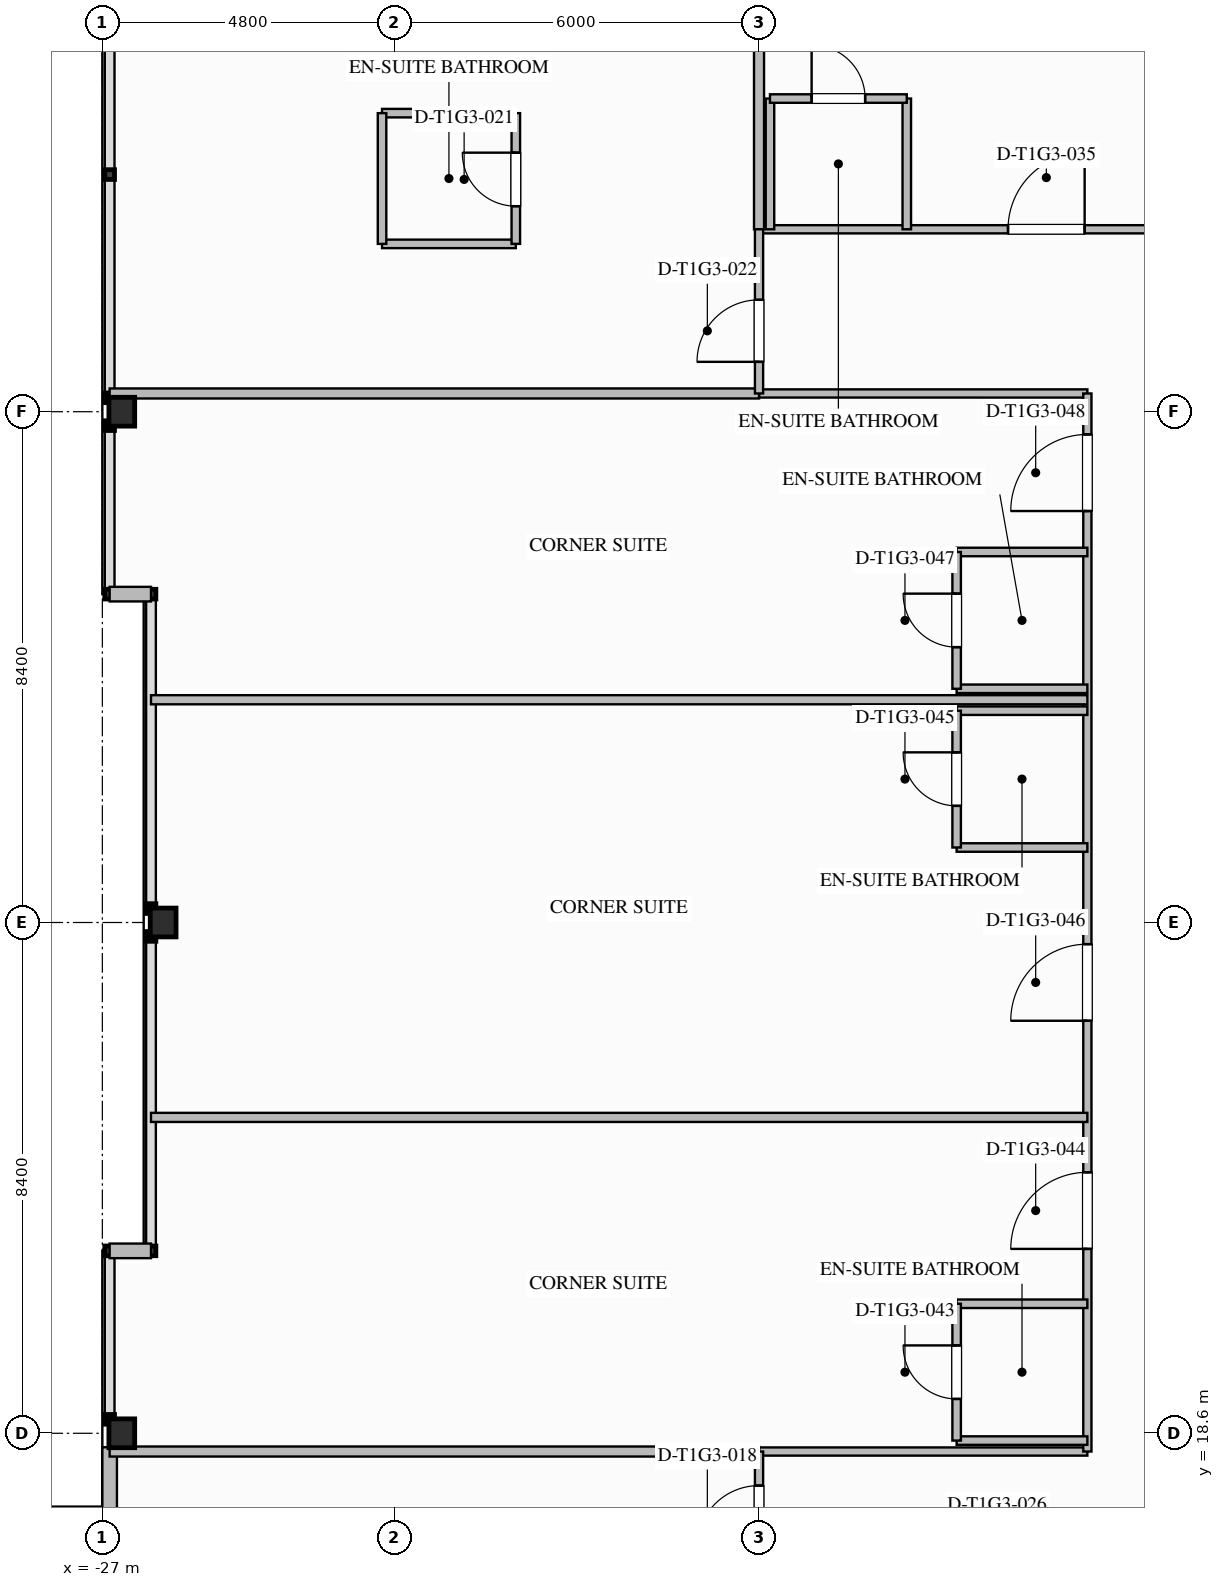
"""IFC4 building model, lengths in metres.
Left out: names, types, materials, properties, quantities, classifications, styles, units other than length and angle.
Written with IfcOpenShell. Run it as: python <this file> out.ifc"""

import sys

from ifc_helpers import new_model, si_unit, direction, frame, frame_2d, origin, origin_2d, place, context, subcontext, project, spatial, rectangle, i_section, extrude, element, fill, save


model = new_model("IFC4")
c1 = context("Model", 3, precision=1e-05, world=origin(), true_north=direction((0.0, 1.0)))
c2 = subcontext(c1, "Body", "Model", "MODEL_VIEW")
j1 = project(units=[si_unit("LENGTHUNIT", "METRE"), si_unit("PLANEANGLEUNIT", "RADIAN")], contexts=[c1])
p1 = place(None, origin())
s1 = spatial("IfcSite", under=j1, at=p1, CompositionType="ELEMENT")
p2 = place(p1, origin())
s2 = spatial("IfcBuilding", under=s1, at=p2, CompositionType="ELEMENT")
p3 = place(p2, frame((0.0, 0.0, 61.2)))
s3 = spatial("IfcBuildingStorey", under=s2, at=p3, CompositionType="ELEMENT", Elevation=61.2)
for number, where, z_axis, x_axis in (
    (1, (-26.68, 18.6, 0.0), (0.0, 0.0, 1.0), (1.0, 0.0, 0.0)),
    (2, (-26.0, 27.0, 0.0), (0.0, 0.0, 1.0), (1.0, 0.0, 0.0)),
    (3, (-26.68, 35.4, 0.0), (0.0, 0.0, 1.0), (1.0, 0.0, 0.0)),
):
    element("IfcColumn", number, at=place(p3, frame(where, z_axis=z_axis, x_axis=x_axis)), inside=s3, PredefinedType="COLUMN", context=c2, shape_type="SweptSolid", body=[
        extrude(i_section(OverallWidth=0.424, OverallDepth=0.474, WebThickness=0.048, FlangeThickness=0.077, FilletRadius=0.03, at=origin_2d()), origin(), (0.0, 0.0, 1.0), 3.497),
    ])
p4 = place(p3, frame((-26.88, 11.029, 0.0), z_axis=(0.0, 0.0, 1.0), x_axis=(0.0, 1.0, 0.0)))
e4 = element("IfcWall", 4, at=p4, inside=s3, PredefinedType="STANDARD", context=c2, shape_type="SweptSolid", body=[
    extrude(rectangle(XDim=7.342, YDim=0.24, at=frame_2d((3.671, 0.0))), origin(), (0.0, 0.0, 1.0), 2.629),
])
p5 = place(p4, frame((4.571, 0.0, 0.0)))
e5 = element("IfcOpeningElement", 5, at=p5, cuts=e4, PredefinedType="OPENING", context=c2, shape_type="SweptSolid", body=[
    extrude(rectangle(XDim=1.0, YDim=2.2, at=frame_2d((0.5, 1.1))), frame((0.0, 0.13, 0.0), z_axis=(0.0, -1.0, 0.0), x_axis=(1.0, 0.0, 0.0)), (0.0, 0.0, 1.0), 0.26),
])
p6 = place(p4, frame((1.559, 0.0, 0.75)))
e6 = element("IfcOpeningElement", 6, at=p6, cuts=e4, PredefinedType="OPENING", context=c2, shape_type="SweptSolid", body=[
    extrude(rectangle(XDim=1.8, YDim=1.779, at=frame_2d((0.9, 0.89))), frame((0.0, 0.13, 0.0), z_axis=(0.0, -1.0, 0.0), x_axis=(1.0, 0.0, 0.0)), (0.0, 0.0, 1.0), 0.26),
])
for number, where, z_axis, x_axis in (
    (7, (-26.88, 21.6, 0.0), (0.0, 0.0, 1.0), (1.0, 0.0, 0.0)),
    (8, (-26.2, 32.4, 0.0), (0.0, 0.0, 1.0), (-1.0, 0.0, 0.0)),
):
    element("IfcWall", number, at=place(p3, frame(where, z_axis=z_axis, x_axis=x_axis)), inside=s3, PredefinedType="STANDARD", context=c2, shape_type="SweptSolid", body=[
        extrude(rectangle(XDim=0.68, YDim=0.24, at=frame_2d((0.34, 0.0))), origin(), (0.0, 0.0, 1.0), 3.24),
    ])
p7 = place(p3, frame((-16.2, 38.4, 0.0), z_axis=(0.0, 0.0, 1.0), x_axis=(1.0, 0.0, 0.0)))
e9 = element("IfcWall", 9, at=p7, inside=s3, PredefinedType="PARTITIONING", context=c2, shape_type="SweptSolid", body=[
    extrude(rectangle(XDim=32.4, YDim=0.135, at=frame_2d((16.2, 0.0))), origin(), (0.0, 0.0, 1.0), 3.24),
])
p8 = place(p7, frame((4.095, 0.0, 0.0)))
e10 = element("IfcOpeningElement", 10, at=p8, cuts=e9, PredefinedType="OPENING", context=c2, shape_type="SweptSolid", body=[
    extrude(rectangle(XDim=1.26, YDim=2.2, at=frame_2d((0.63, 1.1))), frame((0.0, 0.077, 0.0), z_axis=(0.0, -1.0, 0.0), x_axis=(1.0, 0.0, 0.0)), (0.0, 0.0, 1.0), 0.155),
])
p9 = place(p7, frame((7.875, 0.0, 0.0)))
e11 = element("IfcOpeningElement", 11, at=p9, cuts=e9, PredefinedType="OPENING", context=c2, shape_type="SweptSolid", body=[
    extrude(rectangle(XDim=1.26, YDim=2.2, at=frame_2d((0.63, 1.1))), frame((0.0, 0.077, 0.0), z_axis=(0.0, -1.0, 0.0), x_axis=(1.0, 0.0, 0.0)), (0.0, 0.0, 1.0), 0.155),
])
p10 = place(p7, frame((15.69, 0.0, 0.0)))
e12 = element("IfcOpeningElement", 12, at=p10, cuts=e9, PredefinedType="OPENING", context=c2, shape_type="SweptSolid", body=[
    extrude(rectangle(XDim=1.02, YDim=2.15, at=frame_2d((0.51, 1.075))), frame((0.0, 0.077, 0.0), z_axis=(0.0, -1.0, 0.0), x_axis=(1.0, 0.0, 0.0)), (0.0, 0.0, 1.0), 0.155),
])
p11 = place(p7, frame((21.645, 0.0, 0.0)))
e13 = element("IfcOpeningElement", 13, at=p11, cuts=e9, PredefinedType="OPENING", context=c2, shape_type="SweptSolid", body=[
    extrude(rectangle(XDim=1.26, YDim=2.2, at=frame_2d((0.63, 1.1))), frame((0.0, 0.077, 0.0), z_axis=(0.0, -1.0, 0.0), x_axis=(1.0, 0.0, 0.0)), (0.0, 0.0, 1.0), 0.155),
])
p12 = place(p7, frame((30.285, 0.0, 0.0)))
e14 = element("IfcOpeningElement", 14, at=p12, cuts=e9, PredefinedType="OPENING", context=c2, shape_type="SweptSolid", body=[
    extrude(rectangle(XDim=1.26, YDim=2.2, at=frame_2d((0.63, 1.1))), frame((0.0, 0.077, 0.0), z_axis=(0.0, -1.0, 0.0), x_axis=(1.0, 0.0, 0.0)), (0.0, 0.0, 1.0), 0.155),
])
for number, where, z_axis, x_axis in (
    (15, (-16.2, 18.3, 0.0), (0.0, 0.0, 1.0), (1.0, 0.0, 0.0)),
    (16, (-16.2, 35.7, 0.0), (0.0, 0.0, 1.0), (1.0, 0.0, 0.0)),
):
    element("IfcWall", number, at=place(p3, frame(where, z_axis=z_axis, x_axis=x_axis)), inside=s3, PredefinedType="PARTITIONING", context=c2, shape_type="SweptSolid", body=[
        extrude(rectangle(XDim=5.4, YDim=0.135, at=frame_2d((2.7, 0.0))), origin(), (0.0, 0.0, 1.0), 3.24),
    ])
p13 = place(p3, frame((-10.8, 18.3, 0.0), z_axis=(0.0, 0.0, 1.0), x_axis=(0.0, 1.0, 0.0)))
e17 = element("IfcWall", 17, at=p13, inside=s3, PredefinedType="PARTITIONING", context=c2, shape_type="SweptSolid", body=[
    extrude(rectangle(XDim=17.4, YDim=0.135, at=frame_2d((8.7, 0.0))), origin(), (0.0, 0.0, 1.0), 3.24),
])
p14 = place(p13, frame((3.332, 0.0, 0.0)))
e18 = element("IfcOpeningElement", 18, at=p14, cuts=e17, PredefinedType="OPENING", context=c2, shape_type="SweptSolid", body=[
    extrude(rectangle(XDim=1.26, YDim=2.2, at=frame_2d((0.63, 1.1))), frame((0.0, 0.077, 0.0), z_axis=(0.0, -1.0, 0.0), x_axis=(1.0, 0.0, 0.0)), (0.0, 0.0, 1.0), 0.155),
])
p15 = place(p13, frame((7.084, 0.0, 0.0)))
e19 = element("IfcOpeningElement", 19, at=p15, cuts=e17, PredefinedType="OPENING", context=c2, shape_type="SweptSolid", body=[
    extrude(rectangle(XDim=1.26, YDim=2.2, at=frame_2d((0.63, 1.1))), frame((0.0, 0.077, 0.0), z_axis=(0.0, -1.0, 0.0), x_axis=(1.0, 0.0, 0.0)), (0.0, 0.0, 1.0), 0.155),
])
p16 = place(p13, frame((15.467, 0.0, 0.0)))
e20 = element("IfcOpeningElement", 20, at=p16, cuts=e17, PredefinedType="OPENING", context=c2, shape_type="SweptSolid", body=[
    extrude(rectangle(XDim=1.26, YDim=2.2, at=frame_2d((0.63, 1.1))), frame((0.0, 0.077, 0.0), z_axis=(0.0, -1.0, 0.0), x_axis=(1.0, 0.0, 0.0)), (0.0, 0.0, 1.0), 0.155),
])
p17 = place(p3, frame((-16.2, 38.4, 0.0), z_axis=(0.0, 0.0, 1.0), x_axis=(0.0, 1.0, 0.0)))
e21 = element("IfcWall", 21, at=p17, inside=s3, PredefinedType="PARTITIONING", context=c2, shape_type="SweptSolid", body=[
    extrude(rectangle(XDim=15.48, YDim=0.165, at=frame_2d((7.74, 0.0))), origin(), (0.0, 0.0, 1.0), 2.452),
])
for number, where, z_axis, x_axis in (
    (22, (-26.88, 18.3, 0.0), (0.0, 0.0, 1.0), (1.0, 0.0, 0.0)),
    (23, (-26.88, 35.7, 0.0), (0.0, 0.0, 1.0), (1.0, 0.0, 0.0)),
):
    element("IfcWall", number, at=place(p3, frame(where, z_axis=z_axis, x_axis=x_axis)), inside=s3, PredefinedType="PARTITIONING", context=c2, shape_type="SweptSolid", body=[
        extrude(rectangle(XDim=10.68, YDim=0.165, at=frame_2d((5.34, 0.0))), origin(), (0.0, 0.0, 1.0), 2.452),
    ])
p18 = place(p3, frame((-16.2, 16.2, 0.0), z_axis=(0.0, 0.0, 1.0), x_axis=(0.0, 1.0, 0.0)))
e24 = element("IfcWall", 24, at=p18, inside=s3, PredefinedType="PARTITIONING", context=c2, shape_type="SweptSolid", body=[
    extrude(rectangle(XDim=2.1, YDim=0.135, at=frame_2d((1.05, 0.0))), origin(), (0.0, 0.0, 1.0), 2.452),
])
p19 = place(p18, frame((0.52, 0.0, 0.0)))
e25 = element("IfcOpeningElement", 25, at=p19, cuts=e24, PredefinedType="OPENING", context=c2, shape_type="SweptSolid", body=[
    extrude(rectangle(XDim=1.02, YDim=2.15, at=frame_2d((0.51, 1.075))), frame((0.0, 0.077, 0.0), z_axis=(0.0, -1.0, 0.0), x_axis=(1.0, 0.0, 0.0)), (0.0, 0.0, 1.0), 0.155),
])
p20 = place(p3, frame((-16.2, 35.7, 0.0), z_axis=(0.0, 0.0, 1.0), x_axis=(0.0, 1.0, 0.0)))
e26 = element("IfcWall", 26, at=p20, inside=s3, PredefinedType="PARTITIONING", context=c2, shape_type="SweptSolid", body=[
    extrude(rectangle(XDim=2.7, YDim=0.135, at=frame_2d((1.35, 0.0))), origin(), (0.0, 0.0, 1.0), 2.452),
])
p21 = place(p20, frame((0.52, 0.0, 0.0)))
e27 = element("IfcOpeningElement", 27, at=p21, cuts=e26, PredefinedType="OPENING", context=c2, shape_type="SweptSolid", body=[
    extrude(rectangle(XDim=1.02, YDim=2.15, at=frame_2d((0.51, 1.075))), frame((0.0, 0.077, 0.0), z_axis=(0.0, -1.0, 0.0), x_axis=(1.0, 0.0, 0.0)), (0.0, 0.0, 1.0), 0.155),
])
for number, where, z_axis, x_axis in (
    (28, (-22.4, 38.16, 0.0), (0.0, 0.0, 1.0), (1.0, 0.0, 0.0)),
    (29, (-22.4, 40.31, 0.0), (0.0, 0.0, 1.0), (1.0, 0.0, 0.0)),
):
    element("IfcWall", number, at=place(p3, frame(where, z_axis=z_axis, x_axis=x_axis)), inside=s3, PredefinedType="PLUMBINGWALL", context=c2, shape_type="SweptSolid", body=[
        extrude(rectangle(XDim=2.2, YDim=0.14, at=frame_2d((1.1, 0.0))), origin(), (0.0, 0.0, 1.0), 3.24),
    ])
p22 = place(p3, frame((-22.4, 38.16, 0.0), z_axis=(0.0, 0.0, 1.0), x_axis=(0.0, 1.0, 0.0)))
e30 = element("IfcWall", 30, at=p22, inside=s3, PredefinedType="PLUMBINGWALL", context=c2, shape_type="SweptSolid", body=[
    extrude(rectangle(XDim=2.15, YDim=0.14, at=frame_2d((1.075, 0.0))), origin(), (0.0, 0.0, 1.0), 3.24),
])
p23 = place(p3, frame((-20.2, 38.16, 0.0), z_axis=(0.0, 0.0, 1.0), x_axis=(0.0, 1.0, 0.0)))
e31 = element("IfcWall", 31, at=p23, inside=s3, PredefinedType="PLUMBINGWALL", context=c2, shape_type="SweptSolid", body=[
    extrude(rectangle(XDim=2.15, YDim=0.14, at=frame_2d((1.075, 0.0))), origin(), (0.0, 0.0, 1.0), 3.24),
])
p24 = place(p23, frame((0.62, 0.0, 0.0)))
e32 = element("IfcOpeningElement", 32, at=p24, cuts=e31, PredefinedType="OPENING", context=c2, shape_type="SweptSolid", body=[
    extrude(rectangle(XDim=0.88, YDim=2.1, at=frame_2d((0.44, 1.05))), frame((0.0, 0.08, 0.0), z_axis=(0.0, -1.0, 0.0), x_axis=(1.0, 0.0, 0.0)), (0.0, 0.0, 1.0), 0.16),
])
p25 = place(p3, frame((-16.02, 38.4, 0.0), z_axis=(0.0, 0.0, 1.0), x_axis=(0.0, 1.0, 0.0)))
e33 = element("IfcWall", 33, at=p25, inside=s3, PredefinedType="PLUMBINGWALL", context=c2, shape_type="SweptSolid", body=[
    extrude(rectangle(XDim=2.15, YDim=0.14, at=frame_2d((1.075, 0.0))), origin(), (0.0, 0.0, 1.0), 2.452),
])
p26 = place(p3, frame((-13.77, 38.4, 0.0), z_axis=(0.0, 0.0, 1.0), x_axis=(0.0, 1.0, 0.0)))
e34 = element("IfcWall", 34, at=p26, inside=s3, PredefinedType="PLUMBINGWALL", context=c2, shape_type="SweptSolid", body=[
    extrude(rectangle(XDim=2.15, YDim=0.14, at=frame_2d((1.075, 0.0))), origin(), (0.0, 0.0, 1.0), 3.24),
])
p27 = place(p3, frame((-16.02, 40.55, 0.0), z_axis=(0.0, 0.0, 1.0), x_axis=(1.0, 0.0, 0.0)))
e35 = element("IfcWall", 35, at=p27, inside=s3, PredefinedType="PLUMBINGWALL", context=c2, shape_type="SweptSolid", body=[
    extrude(rectangle(XDim=2.25, YDim=0.14, at=frame_2d((1.125, 0.0))), origin(), (0.0, 0.0, 1.0), 3.24),
])
p28 = place(p27, frame((0.685, 0.0, 0.0)))
e36 = element("IfcOpeningElement", 36, at=p28, cuts=e35, PredefinedType="OPENING", context=c2, shape_type="SweptSolid", body=[
    extrude(rectangle(XDim=0.88, YDim=2.1, at=frame_2d((0.44, 1.05))), frame((0.0, 0.08, 0.0), z_axis=(0.0, -1.0, 0.0), x_axis=(1.0, 0.0, 0.0)), (0.0, 0.0, 1.0), 0.16),
])
p29 = place(p3, frame((-10.8, 18.48, 0.0), z_axis=(0.0, 0.0, 1.0), x_axis=(-1.0, 0.0, 0.0)))
e37 = element("IfcWall", 37, at=p29, inside=s3, PredefinedType="PLUMBINGWALL", context=c2, shape_type="SweptSolid", body=[
    extrude(rectangle(XDim=2.15, YDim=0.14, at=frame_2d((1.075, 0.0))), origin(), (0.0, 0.0, 1.0), 2.617),
])
p30 = place(p3, frame((-10.8, 20.73, 0.0), z_axis=(0.0, 0.0, 1.0), x_axis=(-1.0, 0.0, 0.0)))
e38 = element("IfcWall", 38, at=p30, inside=s3, PredefinedType="PLUMBINGWALL", context=c2, shape_type="SweptSolid", body=[
    extrude(rectangle(XDim=2.15, YDim=0.14, at=frame_2d((1.075, 0.0))), origin(), (0.0, 0.0, 1.0), 3.24),
])
p31 = place(p3, frame((-12.95, 18.48, 0.0), z_axis=(0.0, 0.0, 1.0), x_axis=(0.0, 1.0, 0.0)))
e39 = element("IfcWall", 39, at=p31, inside=s3, PredefinedType="PLUMBINGWALL", context=c2, shape_type="SweptSolid", body=[
    extrude(rectangle(XDim=2.25, YDim=0.14, at=frame_2d((1.125, 0.0))), origin(), (0.0, 0.0, 1.0), 3.24),
])
p32 = place(p31, frame((0.685, 0.0, 0.0)))
e40 = element("IfcOpeningElement", 40, at=p32, cuts=e39, PredefinedType="OPENING", context=c2, shape_type="SweptSolid", body=[
    extrude(rectangle(XDim=0.88, YDim=2.1, at=frame_2d((0.44, 1.05))), frame((0.0, 0.08, 0.0), z_axis=(0.0, -1.0, 0.0), x_axis=(1.0, 0.0, 0.0)), (0.0, 0.0, 1.0), 0.16),
])
p33 = place(p3, frame((-26.2, 23.795, 0.0), z_axis=(0.0, 0.0, 1.0), x_axis=(1.0, 0.0, 0.0)))
e41 = element("IfcWall", 41, at=p33, inside=s3, PredefinedType="PARTITIONING", context=c2, shape_type="SweptSolid", body=[
    extrude(rectangle(XDim=15.4, YDim=0.15, at=frame_2d((7.7, 0.0))), origin(), (0.0, 0.0, 1.0), 3.24),
])
for number, where, z_axis, x_axis in (
    (42, (-10.8, 28.233, 0.0), (0.0, 0.0, 1.0), (-1.0, 0.0, 0.0)),
    (43, (-10.8, 30.483, 0.0), (0.0, 0.0, 1.0), (-1.0, 0.0, 0.0)),
):
    element("IfcWall", number, at=place(p3, frame(where, z_axis=z_axis, x_axis=x_axis)), inside=s3, PredefinedType="PLUMBINGWALL", context=c2, shape_type="SweptSolid", body=[
        extrude(rectangle(XDim=2.15, YDim=0.14, at=frame_2d((1.075, 0.0))), origin(), (0.0, 0.0, 1.0), 3.24),
    ])
p34 = place(p3, frame((-12.95, 28.233, 0.0), z_axis=(0.0, 0.0, 1.0), x_axis=(0.0, 1.0, 0.0)))
e44 = element("IfcWall", 44, at=p34, inside=s3, PredefinedType="PLUMBINGWALL", context=c2, shape_type="SweptSolid", body=[
    extrude(rectangle(XDim=2.25, YDim=0.14, at=frame_2d((1.125, 0.0))), origin(), (0.0, 0.0, 1.0), 3.24),
])
p35 = place(p34, frame((0.685, 0.0, 0.0)))
e45 = element("IfcOpeningElement", 45, at=p35, cuts=e44, PredefinedType="OPENING", context=c2, shape_type="SweptSolid", body=[
    extrude(rectangle(XDim=0.88, YDim=2.1, at=frame_2d((0.44, 1.05))), frame((0.0, 0.08, 0.0), z_axis=(0.0, -1.0, 0.0), x_axis=(1.0, 0.0, 0.0)), (0.0, 0.0, 1.0), 0.16),
])
p36 = place(p3, frame((-26.2, 30.663, 0.0), z_axis=(0.0, 0.0, 1.0), x_axis=(1.0, 0.0, 0.0)))
e46 = element("IfcWall", 46, at=p36, inside=s3, PredefinedType="PARTITIONING", context=c2, shape_type="SweptSolid", body=[
    extrude(rectangle(XDim=15.4, YDim=0.15, at=frame_2d((7.7, 0.0))), origin(), (0.0, 0.0, 1.0), 3.24),
])
for number, where, z_axis, x_axis in (
    (47, (-10.8, 30.843, 0.0), (0.0, 0.0, 1.0), (-1.0, 0.0, 0.0)),
    (48, (-10.8, 33.093, 0.0), (0.0, 0.0, 1.0), (-1.0, 0.0, 0.0)),
):
    element("IfcWall", number, at=place(p3, frame(where, z_axis=z_axis, x_axis=x_axis)), inside=s3, PredefinedType="PLUMBINGWALL", context=c2, shape_type="SweptSolid", body=[
        extrude(rectangle(XDim=2.15, YDim=0.14, at=frame_2d((1.075, 0.0))), origin(), (0.0, 0.0, 1.0), 3.24),
    ])
p37 = place(p3, frame((-12.95, 30.843, 0.0), z_axis=(0.0, 0.0, 1.0), x_axis=(0.0, 1.0, 0.0)))
e49 = element("IfcWall", 49, at=p37, inside=s3, PredefinedType="PLUMBINGWALL", context=c2, shape_type="SweptSolid", body=[
    extrude(rectangle(XDim=2.25, YDim=0.14, at=frame_2d((1.125, 0.0))), origin(), (0.0, 0.0, 1.0), 3.24),
])
p38 = place(p37, frame((0.685, 0.0, 0.0)))
e50 = element("IfcOpeningElement", 50, at=p38, cuts=e49, PredefinedType="OPENING", context=c2, shape_type="SweptSolid", body=[
    extrude(rectangle(XDim=0.88, YDim=2.1, at=frame_2d((0.44, 1.05))), frame((0.0, 0.08, 0.0), z_axis=(0.0, -1.0, 0.0), x_axis=(1.0, 0.0, 0.0)), (0.0, 0.0, 1.0), 0.16),
])
p39 = place(p19, origin())
e51 = element("IfcDoor", 51, at=p39, inside=s3, OperationType="SINGLE_SWING_LEFT", PredefinedType="DOOR", context=c2, shape_type="SweptSolid", body=[
    extrude(rectangle(XDim=1.02, YDim=2.15, at=frame_2d((0.51, 1.075))), frame((0.0, 0.025, 0.0), z_axis=(0.0, -1.0, 0.0), x_axis=(1.0, 0.0, 0.0)), (0.0, 0.0, 1.0), 0.05),
])
fill(e25, e51)
p40 = place(p24, origin())
e52 = element("IfcDoor", 52, at=p40, inside=s3, OperationType="SINGLE_SWING_RIGHT", PredefinedType="DOOR", context=c2, shape_type="SweptSolid", body=[
    extrude(rectangle(XDim=0.88, YDim=2.1, at=frame_2d((0.44, 1.05))), frame((0.0, 0.025, 0.0), z_axis=(0.0, -1.0, 0.0), x_axis=(1.0, 0.0, 0.0)), (0.0, 0.0, 1.0), 0.05),
])
fill(e32, e52)
p41 = place(p21, origin())
e53 = element("IfcDoor", 53, at=p41, inside=s3, OperationType="SINGLE_SWING_LEFT", PredefinedType="DOOR", context=c2, shape_type="SweptSolid", body=[
    extrude(rectangle(XDim=1.02, YDim=2.15, at=frame_2d((0.51, 1.075))), frame((0.0, 0.025, 0.0), z_axis=(0.0, -1.0, 0.0), x_axis=(1.0, 0.0, 0.0)), (0.0, 0.0, 1.0), 0.05),
])
fill(e27, e53)
p42 = place(p28, origin())
e54 = element("IfcDoor", 54, at=p42, inside=s3, OperationType="SINGLE_SWING_LEFT", PredefinedType="DOOR", context=c2, shape_type="SweptSolid", body=[
    extrude(rectangle(XDim=0.88, YDim=2.1, at=frame_2d((0.44, 1.05))), frame((0.0, 0.025, 0.0), z_axis=(0.0, -1.0, 0.0), x_axis=(1.0, 0.0, 0.0)), (0.0, 0.0, 1.0), 0.05),
])
fill(e36, e54)
p43 = place(p8, origin())
e55 = element("IfcDoor", 55, at=p43, inside=s3, OperationType="SINGLE_SWING_RIGHT", PredefinedType="DOOR", context=c2, shape_type="SweptSolid", body=[
    extrude(rectangle(XDim=1.26, YDim=2.2, at=frame_2d((0.63, 1.1))), frame((0.0, 0.025, 0.0), z_axis=(0.0, -1.0, 0.0), x_axis=(1.0, 0.0, 0.0)), (0.0, 0.0, 1.0), 0.05),
])
fill(e10, e55)
p44 = place(p32, origin())
e56 = element("IfcDoor", 56, at=p44, inside=s3, OperationType="SINGLE_SWING_RIGHT", PredefinedType="DOOR", context=c2, shape_type="SweptSolid", body=[
    extrude(rectangle(XDim=0.88, YDim=2.1, at=frame_2d((0.44, 1.05))), frame((0.0, 0.025, 0.0), z_axis=(0.0, -1.0, 0.0), x_axis=(1.0, 0.0, 0.0)), (0.0, 0.0, 1.0), 0.05),
])
fill(e40, e56)
p45 = place(p14, origin())
e57 = element("IfcDoor", 57, at=p45, inside=s3, OperationType="SINGLE_SWING_LEFT", PredefinedType="DOOR", context=c2, shape_type="SweptSolid", body=[
    extrude(rectangle(XDim=1.26, YDim=2.2, at=frame_2d((0.63, 1.1))), frame((0.0, 0.025, 0.0), z_axis=(0.0, -1.0, 0.0), x_axis=(1.0, 0.0, 0.0)), (0.0, 0.0, 1.0), 0.05),
])
fill(e18, e57)
p46 = place(p35, origin())
e58 = element("IfcDoor", 58, at=p46, inside=s3, OperationType="SINGLE_SWING_RIGHT", PredefinedType="DOOR", context=c2, shape_type="SweptSolid", body=[
    extrude(rectangle(XDim=0.88, YDim=2.1, at=frame_2d((0.44, 1.05))), frame((0.0, 0.025, 0.0), z_axis=(0.0, -1.0, 0.0), x_axis=(1.0, 0.0, 0.0)), (0.0, 0.0, 1.0), 0.05),
])
fill(e45, e58)
p47 = place(p15, origin())
e59 = element("IfcDoor", 59, at=p47, inside=s3, OperationType="SINGLE_SWING_LEFT", PredefinedType="DOOR", context=c2, shape_type="SweptSolid", body=[
    extrude(rectangle(XDim=1.26, YDim=2.2, at=frame_2d((0.63, 1.1))), frame((0.0, 0.025, 0.0), z_axis=(0.0, -1.0, 0.0), x_axis=(1.0, 0.0, 0.0)), (0.0, 0.0, 1.0), 0.05),
])
fill(e19, e59)
p48 = place(p38, origin())
e60 = element("IfcDoor", 60, at=p48, inside=s3, OperationType="SINGLE_SWING_RIGHT", PredefinedType="DOOR", context=c2, shape_type="SweptSolid", body=[
    extrude(rectangle(XDim=0.88, YDim=2.1, at=frame_2d((0.44, 1.05))), frame((0.0, 0.025, 0.0), z_axis=(0.0, -1.0, 0.0), x_axis=(1.0, 0.0, 0.0)), (0.0, 0.0, 1.0), 0.05),
])
fill(e50, e60)
p49 = place(p16, origin())
e61 = element("IfcDoor", 61, at=p49, inside=s3, OperationType="SINGLE_SWING_LEFT", PredefinedType="DOOR", context=c2, shape_type="SweptSolid", body=[
    extrude(rectangle(XDim=1.26, YDim=2.2, at=frame_2d((0.63, 1.1))), frame((0.0, 0.025, 0.0), z_axis=(0.0, -1.0, 0.0), x_axis=(1.0, 0.0, 0.0)), (0.0, 0.0, 1.0), 0.05),
])
fill(e20, e61)
save(model, sys.argv[1])
